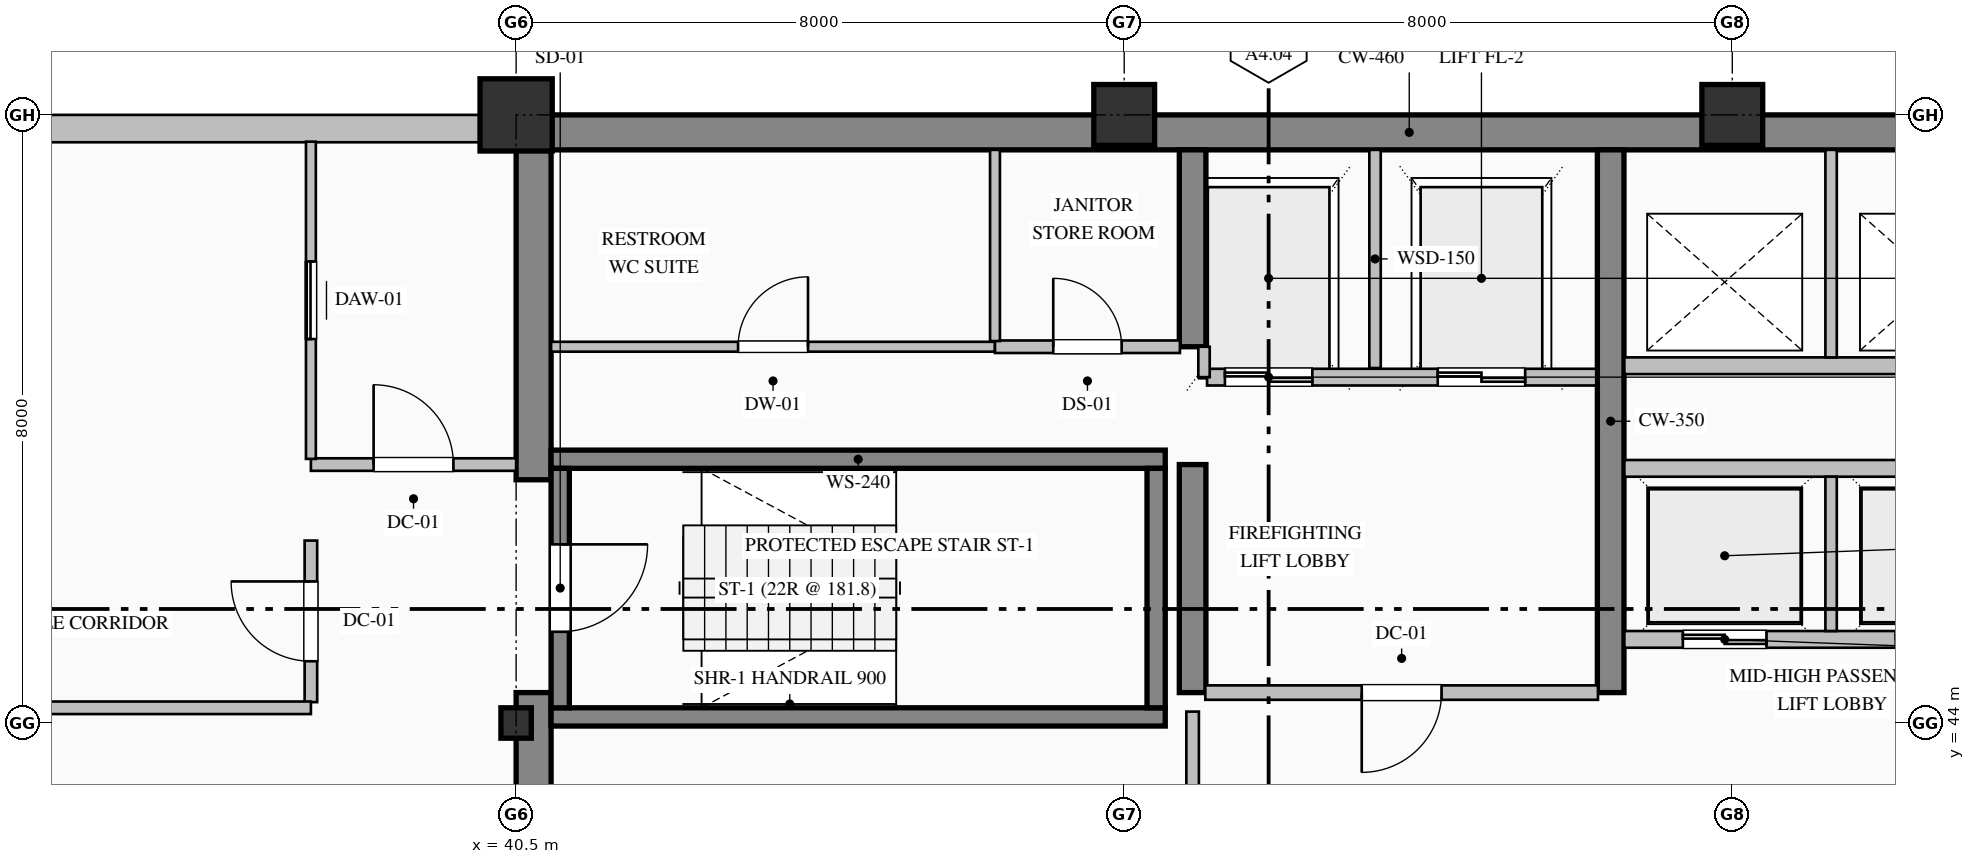
"""IFC4 building model, lengths in metres.
Left out: names, types, materials, properties, quantities, classifications, styles, units other than length and angle.
Written with IfcOpenShell. Run it as: python <this file> out.ifc"""

import sys

from ifc_helpers import new_model, si_unit, direction, frame, frame_2d, origin, origin_2d, place, context, subcontext, project, spatial, rectangle, hollow_rectangle, i_section, extrude, element, fill, save


model = new_model("IFC4")
c1 = context("Model", 3, precision=1e-05, world=origin(), true_north=direction((0.0, 1.0)))
c2 = subcontext(c1, "Body", "Model", "MODEL_VIEW")
j1 = project(units=[si_unit("LENGTHUNIT", "METRE"), si_unit("PLANEANGLEUNIT", "RADIAN")], contexts=[c1])
p1 = place(None, origin())
s1 = spatial("IfcSite", under=j1, at=p1, CompositionType="ELEMENT")
p2 = place(p1, origin())
s2 = spatial("IfcBuilding", under=s1, at=p2, CompositionType="ELEMENT")
p3 = place(p2, frame((0.0, 0.0, 241.8)))
s3 = spatial("IfcBuildingStorey", under=s2, at=p3, CompositionType="ELEMENT", Elevation=241.8)
p4 = place(p3, frame((40.5, 51.77, 0.0), z_axis=(0.0, 0.0, 1.0), x_axis=(1.0, 0.0, 0.0)))
e1 = element("IfcWall", 1, at=p4, inside=s3, PredefinedType="SHEAR", context=c2, shape_type="SweptSolid", body=[
    extrude(rectangle(XDim=23.5, YDim=0.46, at=frame_2d((11.75, 0.0))), origin(), (0.0, 0.0, 1.0), 3.775),
])
p5 = place(p3, frame((40.73, 36.46, 0.0), z_axis=(0.0, 0.0, 1.0), x_axis=(0.0, 1.0, 0.0)))
e2 = element("IfcWall", 2, at=p5, inside=s3, PredefinedType="SHEAR", context=c2, shape_type="SweptSolid", body=[
    extrude(rectangle(XDim=7.94, YDim=0.46, at=frame_2d((3.97, 0.0))), origin(), (0.0, 0.0, 1.0), 3.775),
])
p6 = place(p3, frame((40.73, 47.2, 0.0), z_axis=(0.0, 0.0, 1.0), x_axis=(0.0, 1.0, 0.0)))
e3 = element("IfcWall", 3, at=p6, inside=s3, PredefinedType="SHEAR", context=c2, shape_type="SweptSolid", body=[
    extrude(rectangle(XDim=4.34, YDim=0.46, at=frame_2d((2.17, 0.0))), origin(), (0.0, 0.0, 1.0), 3.775),
])
p7 = place(p3, frame((49.4, 44.4, 0.0), z_axis=(0.0, 0.0, 1.0), x_axis=(0.0, 1.0, 0.0)))
e4 = element("IfcWall", 4, at=p7, inside=s3, PredefinedType="SHEAR", context=c2, shape_type="SweptSolid", body=[
    extrude(rectangle(XDim=3.0, YDim=0.35, at=frame_2d((1.5, 0.0))), origin(), (0.0, 0.0, 1.0), 3.775),
])
p8 = place(p3, frame((49.4, 48.95, 0.0), z_axis=(0.0, 0.0, 1.0), x_axis=(0.0, 1.0, 0.0)))
e5 = element("IfcWall", 5, at=p8, inside=s3, PredefinedType="SHEAR", context=c2, shape_type="SweptSolid", body=[
    extrude(rectangle(XDim=2.59, YDim=0.35, at=frame_2d((1.295, 0.0))), origin(), (0.0, 0.0, 1.0), 3.775),
])
p9 = place(p3, frame((54.9, 44.4, 0.0), z_axis=(0.0, 0.0, 1.0), x_axis=(0.0, 1.0, 0.0)))
e6 = element("IfcWall", 6, at=p9, inside=s3, PredefinedType="SHEAR", context=c2, shape_type="SweptSolid", body=[
    extrude(rectangle(XDim=7.14, YDim=0.35, at=frame_2d((3.57, 0.0))), origin(), (0.0, 0.0, 1.0), 3.775),
])
p10 = place(p3, frame((40.5, 44.0, 0.0), z_axis=(0.0, 0.0, 1.0), x_axis=(1.0, 0.0, 0.0)))
e7 = element("IfcColumn", 7, at=p10, inside=s3, PredefinedType="COLUMN", context=c2, shape_type="SweptSolid", body=[
    extrude(i_section(OverallWidth=0.4, OverallDepth=0.4, WebThickness=0.013, FlangeThickness=0.021, FilletRadius=0.022, at=origin_2d()), origin(), (0.0, 0.0, 1.0), 4.0),
])
p11 = place(p3, frame((40.5, 52.0, 0.0), z_axis=(0.0, 0.0, 1.0), x_axis=(1.0, 0.0, 0.0)))
e8 = element("IfcColumn", 8, at=p11, inside=s3, PredefinedType="COLUMN", context=c2, shape_type="SweptSolid", body=[
    extrude(hollow_rectangle(XDim=0.95, YDim=0.95, WallThickness=0.036, at=origin_2d()), origin(), (0.0, 0.0, 1.0), 4.0),
])
for number, where, z_axis, x_axis in (
    (9, (48.5, 52.0, 0.0), (0.0, 0.0, 1.0), (1.0, 0.0, 0.0)),
    (10, (56.5, 52.0, 0.0), (0.0, 0.0, 1.0), (1.0, 0.0, 0.0)),
):
    element("IfcColumn", number, at=place(p3, frame(where, z_axis=z_axis, x_axis=x_axis)), inside=s3, PredefinedType="COLUMN", context=c2, shape_type="SweptSolid", body=[
        extrude(hollow_rectangle(XDim=0.8, YDim=0.8, WallThickness=0.032, at=origin_2d()), origin(), (0.0, 0.0, 1.0), 4.0),
    ])
p12 = place(p3, frame((13.0, 51.82, 0.0), z_axis=(0.0, 0.0, 1.0), x_axis=(1.0, 0.0, 0.0)))
e11 = element("IfcWall", 11, at=p12, inside=s3, PredefinedType="SOLIDWALL", context=c2, shape_type="SweptSolid", body=[
    extrude(rectangle(XDim=27.52, YDim=0.36, at=frame_2d((13.76, 0.0))), origin(), (0.0, 0.0, 1.0), 3.325),
])
p13 = place(p12, frame((6.525, 0.0, 0.9)))
e12 = element("IfcOpeningElement", 12, at=p13, cuts=e11, PredefinedType="OPENING", context=c2, shape_type="SweptSolid", body=[
    extrude(rectangle(XDim=1.35, YDim=1.85, at=frame_2d((0.675, 0.925))), frame((0.0, 0.19, 0.0), z_axis=(0.0, -1.0, 0.0), x_axis=(1.0, 0.0, 0.0)), (0.0, 0.0, 1.0), 0.38),
])
p14 = place(p12, frame((17.325, 0.0, 0.9)))
e13 = element("IfcOpeningElement", 13, at=p14, cuts=e11, PredefinedType="OPENING", context=c2, shape_type="SweptSolid", body=[
    extrude(rectangle(XDim=1.35, YDim=1.85, at=frame_2d((0.675, 0.925))), frame((0.0, 0.19, 0.0), z_axis=(0.0, -1.0, 0.0), x_axis=(1.0, 0.0, 0.0)), (0.0, 0.0, 1.0), 0.38),
])
for number, where, z_axis, x_axis in (
    (14, (40.96, 47.47, 0.0), (0.0, 0.0, 1.0), (1.0, 0.0, 0.0)),
    (15, (49.04, 44.08, 0.0), (0.0, 0.0, 1.0), (-1.0, 0.0, 0.0)),
):
    element("IfcWall", number, at=place(p3, frame(where, z_axis=z_axis, x_axis=x_axis)), inside=s3, PredefinedType="SOLIDWALL", context=c2, shape_type="SweptSolid", body=[
        extrude(rectangle(XDim=8.08, YDim=0.24, at=frame_2d((4.04, 0.0))), origin(), (0.0, 0.0, 1.0), 4.0),
    ])
p15 = place(p3, frame((41.08, 47.35, 0.0), z_axis=(0.0, 0.0, 1.0), x_axis=(0.0, -1.0, 0.0)))
e16 = element("IfcWall", 16, at=p15, inside=s3, PredefinedType="SOLIDWALL", context=c2, shape_type="SweptSolid", body=[
    extrude(rectangle(XDim=3.15, YDim=0.24, at=frame_2d((1.575, 0.0))), origin(), (0.0, 0.0, 1.0), 4.0),
])
p16 = place(p15, frame((1.0, 0.0, 0.0)))
e17 = element("IfcOpeningElement", 17, at=p16, cuts=e16, PredefinedType="OPENING", context=c2, shape_type="SweptSolid", body=[
    extrude(rectangle(XDim=1.15, YDim=2.2, at=frame_2d((0.575, 1.1))), frame((0.0, 0.13, 0.0), z_axis=(0.0, -1.0, 0.0), x_axis=(1.0, 0.0, 0.0)), (0.0, 0.0, 1.0), 0.26),
])
p17 = place(p3, frame((48.92, 44.2, 0.0), z_axis=(0.0, 0.0, 1.0), x_axis=(0.0, 1.0, 0.0)))
e18 = element("IfcWall", 18, at=p17, inside=s3, PredefinedType="SOLIDWALL", context=c2, shape_type="SweptSolid", body=[
    extrude(rectangle(XDim=3.15, YDim=0.24, at=frame_2d((1.575, 0.0))), origin(), (0.0, 0.0, 1.0), 4.0),
])
p18 = place(p3, frame((54.71, 48.55, 0.0), z_axis=(0.0, 0.0, 1.0), x_axis=(-1.0, 0.0, 0.0)))
e19 = element("IfcWall", 19, at=p18, inside=s3, PredefinedType="PARTITIONING", context=c2, shape_type="SweptSolid", body=[
    extrude(rectangle(XDim=5.12, YDim=0.22, at=frame_2d((2.56, 0.0))), origin(), (0.0, 0.0, 1.0), 3.775),
])
p19 = place(p18, frame((3.735, 0.0, 0.0)))
e20 = element("IfcOpeningElement", 20, at=p19, cuts=e19, PredefinedType="OPENING", context=c2, shape_type="SweptSolid", body=[
    extrude(rectangle(XDim=1.15, YDim=2.2, at=frame_2d((0.575, 1.1))), frame((0.0, 0.12, 0.0), z_axis=(0.0, -1.0, 0.0), x_axis=(1.0, 0.0, 0.0)), (0.0, 0.0, 1.0), 0.24),
])
p20 = place(p18, frame((0.935, 0.0, 0.0)))
e21 = element("IfcOpeningElement", 21, at=p20, cuts=e19, PredefinedType="OPENING", context=c2, shape_type="SweptSolid", body=[
    extrude(rectangle(XDim=1.15, YDim=2.2, at=frame_2d((0.575, 1.1))), frame((0.0, 0.12, 0.0), z_axis=(0.0, -1.0, 0.0), x_axis=(1.0, 0.0, 0.0)), (0.0, 0.0, 1.0), 0.24),
])
p21 = place(p3, frame((51.8, 48.67, 0.0), z_axis=(0.0, 0.0, 1.0), x_axis=(0.0, 1.0, 0.0)))
e22 = element("IfcWall", 22, at=p21, inside=s3, PredefinedType="PARTITIONING", context=c2, shape_type="SweptSolid", body=[
    extrude(rectangle(XDim=2.87, YDim=0.15, at=frame_2d((1.435, 0.0))), origin(), (0.0, 0.0, 1.0), 3.775),
])
p22 = place(p3, frame((49.55, 48.55, 0.0), z_axis=(0.0, 0.0, 1.0), x_axis=(0.0, 1.0, 0.0)))
e23 = element("IfcWall", 23, at=p22, inside=s3, PredefinedType="PARTITIONING", context=c2, shape_type="SweptSolid", body=[
    extrude(rectangle(XDim=0.4, YDim=0.15, at=frame_2d((0.2, 0.0))), origin(), (0.0, 0.0, 1.0), 3.775),
])
p23 = place(p3, frame((63.32, 45.1, 0.0), z_axis=(0.0, 0.0, 1.0), x_axis=(-1.0, 0.0, 0.0)))
e24 = element("IfcWall", 24, at=p23, inside=s3, PredefinedType="PARTITIONING", context=c2, shape_type="SweptSolid", body=[
    extrude(rectangle(XDim=8.24, YDim=0.22, at=frame_2d((4.12, 0.0))), origin(), (0.0, 0.0, 1.0), 3.775),
])
p24 = place(p23, frame((6.37, 0.0, 0.0)))
e25 = element("IfcOpeningElement", 25, at=p24, cuts=e24, PredefinedType="OPENING", context=c2, shape_type="SweptSolid", body=[
    extrude(rectangle(XDim=1.1, YDim=2.2, at=frame_2d((0.55, 1.1))), frame((0.0, 0.12, 0.0), z_axis=(0.0, -1.0, 0.0), x_axis=(1.0, 0.0, 0.0)), (0.0, 0.0, 1.0), 0.24),
])
p25 = place(p23, frame((3.57, 0.0, 0.0)))
e26 = element("IfcOpeningElement", 26, at=p25, cuts=e24, PredefinedType="OPENING", context=c2, shape_type="SweptSolid", body=[
    extrude(rectangle(XDim=1.1, YDim=2.2, at=frame_2d((0.55, 1.1))), frame((0.0, 0.12, 0.0), z_axis=(0.0, -1.0, 0.0), x_axis=(1.0, 0.0, 0.0)), (0.0, 0.0, 1.0), 0.24),
])
p26 = place(p23, frame((0.77, 0.0, 0.0)))
e27 = element("IfcOpeningElement", 27, at=p26, cuts=e24, PredefinedType="OPENING", context=c2, shape_type="SweptSolid", body=[
    extrude(rectangle(XDim=1.1, YDim=2.2, at=frame_2d((0.55, 1.1))), frame((0.0, 0.12, 0.0), z_axis=(0.0, -1.0, 0.0), x_axis=(1.0, 0.0, 0.0)), (0.0, 0.0, 1.0), 0.24),
])
p27 = place(p3, frame((55.08, 47.35, 0.0), z_axis=(0.0, 0.0, 1.0), x_axis=(1.0, 0.0, 0.0)))
e28 = element("IfcWall", 28, at=p27, inside=s3, PredefinedType="PARTITIONING", context=c2, shape_type="SweptSolid", body=[
    extrude(rectangle(XDim=8.24, YDim=0.22, at=frame_2d((4.12, 0.0))), origin(), (0.0, 0.0, 1.0), 3.775),
])
p28 = place(p3, frame((57.8, 45.21, 0.0), z_axis=(0.0, 0.0, 1.0), x_axis=(0.0, 1.0, 0.0)))
e29 = element("IfcWall", 29, at=p28, inside=s3, PredefinedType="PARTITIONING", context=c2, shape_type="SweptSolid", body=[
    extrude(rectangle(XDim=2.03, YDim=0.15, at=frame_2d((1.015, 0.0))), origin(), (0.0, 0.0, 1.0), 3.775),
])
p29 = place(p3, frame((63.32, 48.7, 0.0), z_axis=(0.0, 0.0, 1.0), x_axis=(-1.0, 0.0, 0.0)))
e30 = element("IfcWall", 30, at=p29, inside=s3, PredefinedType="PARTITIONING", context=c2, shape_type="SweptSolid", body=[
    extrude(rectangle(XDim=8.24, YDim=0.22, at=frame_2d((4.12, 0.0))), origin(), (0.0, 0.0, 1.0), 3.775),
])
p30 = place(p3, frame((57.8, 48.81, 0.0), z_axis=(0.0, 0.0, 1.0), x_axis=(0.0, 1.0, 0.0)))
e31 = element("IfcWall", 31, at=p30, inside=s3, PredefinedType="PARTITIONING", context=c2, shape_type="SweptSolid", body=[
    extrude(rectangle(XDim=2.73, YDim=0.15, at=frame_2d((1.365, 0.0))), origin(), (0.0, 0.0, 1.0), 3.775),
])
p31 = place(p3, frame((37.8, 47.4, 0.0), z_axis=(0.0, 0.0, 1.0), x_axis=(1.0, 0.0, 0.0)))
e32 = element("IfcWall", 32, at=p31, inside=s3, PredefinedType="PARTITIONING", context=c2, shape_type="SweptSolid", body=[
    extrude(rectangle(XDim=2.7, YDim=0.165, at=frame_2d((1.35, 0.0))), origin(), (0.0, 0.0, 1.0), 3.775),
])
p32 = place(p31, frame((0.825, 0.0, 0.0)))
e33 = element("IfcOpeningElement", 33, at=p32, cuts=e32, PredefinedType="OPENING", context=c2, shape_type="SweptSolid", body=[
    extrude(rectangle(XDim=1.05, YDim=2.15, at=frame_2d((0.525, 1.075))), frame((0.0, 0.093, 0.0), z_axis=(0.0, -1.0, 0.0), x_axis=(1.0, 0.0, 0.0)), (0.0, 0.0, 1.0), 0.185),
])
p33 = place(p3, frame((37.8, 44.274, 0.0), z_axis=(0.0, 0.0, 1.0), x_axis=(0.0, 1.0, 0.0)))
e34 = element("IfcWall", 34, at=p33, inside=s3, PredefinedType="PARTITIONING", context=c2, shape_type="SweptSolid", body=[
    extrude(rectangle(XDim=2.125, YDim=0.165, at=frame_2d((1.063, 0.0))), origin(), (0.0, 0.0, 1.0), 3.775),
])
p34 = place(p33, frame((0.538, 0.0, 0.0)))
e35 = element("IfcOpeningElement", 35, at=p34, cuts=e34, PredefinedType="OPENING", context=c2, shape_type="SweptSolid", body=[
    extrude(rectangle(XDim=1.05, YDim=2.15, at=frame_2d((0.525, 1.075))), frame((0.0, 0.093, 0.0), z_axis=(0.0, -1.0, 0.0), x_axis=(1.0, 0.0, 0.0)), (0.0, 0.0, 1.0), 0.185),
])
p35 = place(p3, frame((37.8, 47.475, 0.0), z_axis=(0.0, 0.0, 1.0), x_axis=(0.0, 1.0, 0.0)))
e36 = element("IfcWall", 36, at=p35, inside=s3, PredefinedType="PARTITIONING", context=c2, shape_type="SweptSolid", body=[
    extrude(rectangle(XDim=4.173, YDim=0.13, at=frame_2d((2.087, 0.0))), origin(), (0.0, 0.0, 1.0), 3.775),
])
p36 = place(p35, frame((1.577, 0.0, 0.0)))
e37 = element("IfcOpeningElement", 37, at=p36, cuts=e36, PredefinedType="OPENING", context=c2, shape_type="SweptSolid", body=[
    extrude(rectangle(XDim=1.02, YDim=2.15, at=frame_2d((0.51, 1.075))), frame((0.0, 0.075, 0.0), z_axis=(0.0, -1.0, 0.0), x_axis=(1.0, 0.0, 0.0)), (0.0, 0.0, 1.0), 0.15),
])
p37 = place(p3, frame((40.96, 48.95, 0.0), z_axis=(0.0, 0.0, 1.0), x_axis=(1.0, 0.0, 0.0)))
e38 = element("IfcWall", 38, at=p37, inside=s3, PredefinedType="PARTITIONING", context=c2, shape_type="SweptSolid", body=[
    extrude(rectangle(XDim=5.84, YDim=0.13, at=frame_2d((2.92, 0.0))), origin(), (0.0, 0.0, 1.0), 3.775),
])
p38 = place(p37, frame((2.46, 0.0, 0.0)))
e39 = element("IfcOpeningElement", 39, at=p38, cuts=e38, PredefinedType="OPENING", context=c2, shape_type="SweptSolid", body=[
    extrude(rectangle(XDim=0.92, YDim=2.15, at=frame_2d((0.46, 1.075))), frame((0.0, 0.075, 0.0), z_axis=(0.0, -1.0, 0.0), x_axis=(1.0, 0.0, 0.0)), (0.0, 0.0, 1.0), 0.15),
])
p39 = place(p3, frame((46.8, 48.95, 0.0), z_axis=(0.0, 0.0, 1.0), x_axis=(1.0, 0.0, 0.0)))
e40 = element("IfcWall", 40, at=p39, inside=s3, PredefinedType="PARTITIONING", context=c2, shape_type="SweptSolid", body=[
    extrude(rectangle(XDim=2.433, YDim=0.165, at=frame_2d((1.216, 0.0))), origin(), (0.0, 0.0, 1.0), 3.775),
])
p40 = place(p39, frame((0.767, 0.0, 0.0)))
e41 = element("IfcOpeningElement", 41, at=p40, cuts=e40, PredefinedType="OPENING", context=c2, shape_type="SweptSolid", body=[
    extrude(rectangle(XDim=0.9, YDim=2.15, at=frame_2d((0.45, 1.075))), frame((0.0, 0.093, 0.0), z_axis=(0.0, -1.0, 0.0), x_axis=(1.0, 0.0, 0.0)), (0.0, 0.0, 1.0), 0.185),
])
p41 = place(p3, frame((54.733, 44.4, 0.0), z_axis=(0.0, 0.0, 1.0), x_axis=(-1.0, 0.0, 0.0)))
e42 = element("IfcWall", 42, at=p41, inside=s3, PredefinedType="PARTITIONING", context=c2, shape_type="SweptSolid", body=[
    extrude(rectangle(XDim=5.166, YDim=0.19, at=frame_2d((2.583, 0.0))), origin(), (0.0, 0.0, 1.0), 3.775),
])
p42 = place(p41, frame((2.058, 0.0, 0.0)))
e43 = element("IfcOpeningElement", 43, at=p42, cuts=e42, PredefinedType="OPENING", context=c2, shape_type="SweptSolid", body=[
    extrude(rectangle(XDim=1.05, YDim=2.15, at=frame_2d((0.525, 1.075))), frame((0.0, 0.105, 0.0), z_axis=(0.0, -1.0, 0.0), x_axis=(1.0, 0.0, 0.0)), (0.0, 0.0, 1.0), 0.21),
])
p43 = place(p3, frame((49.4, 36.46, 0.0), z_axis=(0.0, 0.0, 1.0), x_axis=(0.0, 1.0, 0.0)))
e44 = element("IfcWall", 44, at=p43, inside=s3, PredefinedType="PARTITIONING", context=c2, shape_type="SweptSolid", body=[
    extrude(rectangle(XDim=7.69, YDim=0.165, at=frame_2d((3.845, 0.0))), origin(), (0.0, 0.0, 1.0), 3.017),
])
p44 = place(p43, frame((3.345, 0.0, 0.0)))
e45 = element("IfcOpeningElement", 45, at=p44, cuts=e44, PredefinedType="OPENING", context=c2, shape_type="SweptSolid", body=[
    extrude(rectangle(XDim=1.0, YDim=2.15, at=frame_2d((0.5, 1.075))), frame((0.0, 0.093, 0.0), z_axis=(0.0, -1.0, 0.0), x_axis=(1.0, 0.0, 0.0)), (0.0, 0.0, 1.0), 0.185),
])
p45 = place(p3, frame((46.8, 51.54, 0.0), z_axis=(0.0, 0.0, 1.0), x_axis=(0.0, -1.0, 0.0)))
e46 = element("IfcWall", 46, at=p45, inside=s3, PredefinedType="PARTITIONING", context=c2, shape_type="SweptSolid", body=[
    extrude(rectangle(XDim=2.516, YDim=0.13, at=frame_2d((1.258, 0.0))), origin(), (0.0, 0.0, 1.0), 3.775),
])
p46 = place(p3, frame((37.8, 44.2, 0.0), z_axis=(0.0, 0.0, 1.0), x_axis=(-1.0, 0.0, 0.0)))
e47 = element("IfcWall", 47, at=p46, inside=s3, PredefinedType="PARTITIONING", context=c2, shape_type="SweptSolid", body=[
    extrude(rectangle(XDim=8.2, YDim=0.165, at=frame_2d((4.1, 0.0))), origin(), (0.0, 0.0, 1.0), 3.775),
])
p47 = place(p16, origin())
e48 = element("IfcDoor", 48, at=p47, inside=s3, OperationType="SINGLE_SWING_LEFT", PredefinedType="DOOR", context=c2, shape_type="SweptSolid", body=[
    extrude(rectangle(XDim=1.15, YDim=2.2, at=frame_2d((0.575, 1.1))), frame((0.0, 0.025, 0.0), z_axis=(0.0, -1.0, 0.0), x_axis=(1.0, 0.0, 0.0)), (0.0, 0.0, 1.0), 0.05),
])
fill(e17, e48)
p48 = place(p19, origin())
e49 = element("IfcDoor", 49, at=p48, inside=s3, OperationType="DOUBLE_DOOR_SLIDING", PredefinedType="DOOR", context=c2, shape_type="SweptSolid", body=[
    extrude(rectangle(XDim=1.15, YDim=2.2, at=frame_2d((0.575, 1.1))), frame((0.0, 0.025, 0.0), z_axis=(0.0, -1.0, 0.0), x_axis=(1.0, 0.0, 0.0)), (0.0, 0.0, 1.0), 0.05),
])
fill(e20, e49)
p49 = place(p20, origin())
e50 = element("IfcDoor", 50, at=p49, inside=s3, OperationType="DOUBLE_DOOR_SLIDING", PredefinedType="DOOR", context=c2, shape_type="SweptSolid", body=[
    extrude(rectangle(XDim=1.15, YDim=2.2, at=frame_2d((0.575, 1.1))), frame((0.0, 0.025, 0.0), z_axis=(0.0, -1.0, 0.0), x_axis=(1.0, 0.0, 0.0)), (0.0, 0.0, 1.0), 0.05),
])
fill(e21, e50)
p50 = place(p24, origin())
e51 = element("IfcDoor", 51, at=p50, inside=s3, OperationType="DOUBLE_DOOR_SLIDING", PredefinedType="DOOR", context=c2, shape_type="SweptSolid", body=[
    extrude(rectangle(XDim=1.1, YDim=2.2, at=frame_2d((0.55, 1.1))), frame((0.0, 0.025, 0.0), z_axis=(0.0, -1.0, 0.0), x_axis=(1.0, 0.0, 0.0)), (0.0, 0.0, 1.0), 0.05),
])
fill(e25, e51)
p51 = place(p42, origin())
e52 = element("IfcDoor", 52, at=p51, inside=s3, OperationType="SINGLE_SWING_RIGHT", PredefinedType="DOOR", context=c2, shape_type="SweptSolid", body=[
    extrude(rectangle(XDim=1.05, YDim=2.15, at=frame_2d((0.525, 1.075))), frame((0.0, 0.025, 0.0), z_axis=(0.0, -1.0, 0.0), x_axis=(1.0, 0.0, 0.0)), (0.0, 0.0, 1.0), 0.05),
])
fill(e43, e52)
p52 = place(p32, origin())
e53 = element("IfcDoor", 53, at=p52, inside=s3, OperationType="SINGLE_SWING_LEFT", PredefinedType="DOOR", context=c2, shape_type="SweptSolid", body=[
    extrude(rectangle(XDim=1.05, YDim=2.15, at=frame_2d((0.525, 1.075))), frame((0.0, 0.025, 0.0), z_axis=(0.0, -1.0, 0.0), x_axis=(1.0, 0.0, 0.0)), (0.0, 0.0, 1.0), 0.05),
])
fill(e33, e53)
p53 = place(p34, origin())
e54 = element("IfcDoor", 54, at=p53, inside=s3, OperationType="SINGLE_SWING_RIGHT", PredefinedType="DOOR", context=c2, shape_type="SweptSolid", body=[
    extrude(rectangle(XDim=1.05, YDim=2.15, at=frame_2d((0.525, 1.075))), frame((0.0, 0.025, 0.0), z_axis=(0.0, -1.0, 0.0), x_axis=(1.0, 0.0, 0.0)), (0.0, 0.0, 1.0), 0.05),
])
fill(e35, e54)
p54 = place(p36, origin())
e55 = element("IfcDoor", 55, at=p54, inside=s3, OperationType="SLIDING_TO_LEFT", PredefinedType="DOOR", context=c2, shape_type="SweptSolid", body=[
    extrude(rectangle(XDim=1.02, YDim=2.15, at=frame_2d((0.51, 1.075))), frame((0.0, 0.025, 0.0), z_axis=(0.0, -1.0, 0.0), x_axis=(1.0, 0.0, 0.0)), (0.0, 0.0, 1.0), 0.05),
])
fill(e37, e55)
p55 = place(p38, origin())
e56 = element("IfcDoor", 56, at=p55, inside=s3, OperationType="SINGLE_SWING_RIGHT", PredefinedType="DOOR", context=c2, shape_type="SweptSolid", body=[
    extrude(rectangle(XDim=0.92, YDim=2.15, at=frame_2d((0.46, 1.075))), frame((0.0, 0.025, 0.0), z_axis=(0.0, -1.0, 0.0), x_axis=(1.0, 0.0, 0.0)), (0.0, 0.0, 1.0), 0.05),
])
fill(e39, e56)
p56 = place(p40, origin())
e57 = element("IfcDoor", 57, at=p56, inside=s3, OperationType="SINGLE_SWING_LEFT", PredefinedType="DOOR", context=c2, shape_type="SweptSolid", body=[
    extrude(rectangle(XDim=0.9, YDim=2.15, at=frame_2d((0.45, 1.075))), frame((0.0, 0.025, 0.0), z_axis=(0.0, -1.0, 0.0), x_axis=(1.0, 0.0, 0.0)), (0.0, 0.0, 1.0), 0.05),
])
fill(e41, e57)
save(model, sys.argv[1])
